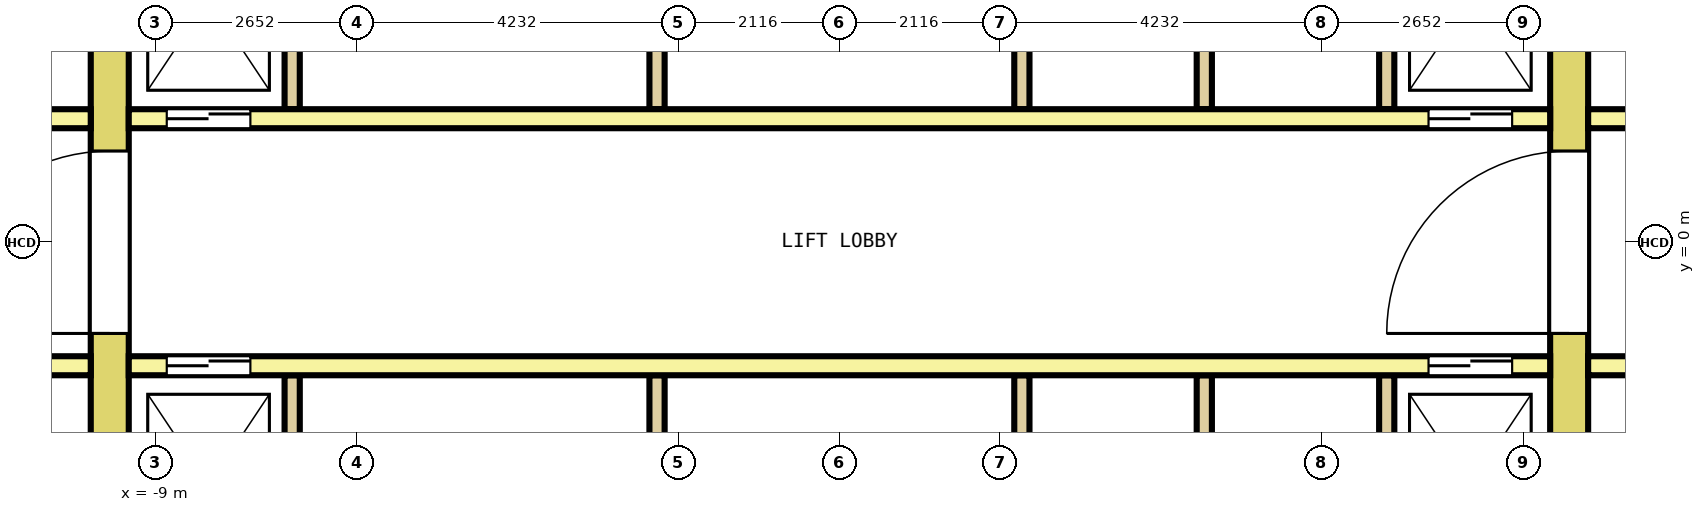
"""IFC4 building model, lengths in metres.
Left out: names, types, materials, properties, quantities, classifications, styles, units other than length and angle.
Written with IfcOpenShell. Run it as: python <this file> out.ifc"""

import sys

from ifc_helpers import new_model, si_unit, direction, frame, frame_2d, origin, place, context, subcontext, project, spatial, rectangle, extrude, element, fill, save


model = new_model("IFC4")
c1 = context("Model", 3, precision=1e-05, world=origin(), true_north=direction((0.0, 1.0)))
c2 = subcontext(c1, "Body", "Model", "MODEL_VIEW")
j1 = project(units=[si_unit("LENGTHUNIT", "METRE"), si_unit("PLANEANGLEUNIT", "RADIAN")], contexts=[c1])
p1 = place(None, origin())
s1 = spatial("IfcSite", under=j1, at=p1, CompositionType="ELEMENT")
p2 = place(p1, origin())
s2 = spatial("IfcBuilding", under=s1, at=p2, CompositionType="ELEMENT")
p3 = place(p2, frame((0.0, 0.0, 94.0)))
s3 = spatial("IfcBuildingStorey", under=s2, at=p3, CompositionType="ELEMENT", Elevation=94.0)
p4 = place(p3, frame((-9.6, -7.7, 0.0), z_axis=(0.0, 0.0, 1.0), x_axis=(0.0, 1.0, 0.0)))
e1 = element("IfcWall", 1, at=p4, inside=s3, PredefinedType="SHEAR", context=c2, shape_type="SweptSolid", body=[
    extrude(rectangle(XDim=15.4, YDim=0.5, at=frame_2d((7.7, 0.0))), origin(), (0.0, 0.0, 1.0), 4.1),
])
p5 = place(p4, frame((6.5, 0.0, 0.0)))
e2 = element("IfcOpeningElement", 2, at=p5, cuts=e1, PredefinedType="OPENING", context=c2, shape_type="SweptSolid", body=[
    extrude(rectangle(XDim=2.4, YDim=2.1, at=frame_2d((1.2, 1.05))), frame((0.0, 0.26, 0.0), z_axis=(0.0, -1.0, 0.0), x_axis=(1.0, 0.0, 0.0)), (0.0, 0.0, 1.0), 0.52),
])
p6 = place(p4, frame((13.4, 0.0, 0.0)))
e3 = element("IfcOpeningElement", 3, at=p6, cuts=e1, PredefinedType="OPENING", context=c2, shape_type="SweptSolid", body=[
    extrude(rectangle(XDim=1.2, YDim=2.1, at=frame_2d((0.6, 1.05))), frame((0.0, 0.26, 0.0), z_axis=(0.0, -1.0, 0.0), x_axis=(1.0, 0.0, 0.0)), (0.0, 0.0, 1.0), 0.52),
])
p7 = place(p4, frame((0.8, 0.0, 0.0)))
e4 = element("IfcOpeningElement", 4, at=p7, cuts=e1, PredefinedType="OPENING", context=c2, shape_type="SweptSolid", body=[
    extrude(rectangle(XDim=1.2, YDim=2.1, at=frame_2d((0.6, 1.05))), frame((0.0, 0.26, 0.0), z_axis=(0.0, -1.0, 0.0), x_axis=(1.0, 0.0, 0.0)), (0.0, 0.0, 1.0), 0.52),
])
p8 = place(p3, frame((9.6, -7.7, 0.0), z_axis=(0.0, 0.0, 1.0), x_axis=(0.0, 1.0, 0.0)))
e5 = element("IfcWall", 5, at=p8, inside=s3, PredefinedType="SHEAR", context=c2, shape_type="SweptSolid", body=[
    extrude(rectangle(XDim=15.4, YDim=0.5, at=frame_2d((7.7, 0.0))), origin(), (0.0, 0.0, 1.0), 4.1),
])
p9 = place(p8, frame((6.5, 0.0, 0.0)))
e6 = element("IfcOpeningElement", 6, at=p9, cuts=e5, PredefinedType="OPENING", context=c2, shape_type="SweptSolid", body=[
    extrude(rectangle(XDim=2.4, YDim=2.1, at=frame_2d((1.2, 1.05))), frame((0.0, 0.26, 0.0), z_axis=(0.0, -1.0, 0.0), x_axis=(1.0, 0.0, 0.0)), (0.0, 0.0, 1.0), 0.52),
])
p10 = place(p8, frame((13.4, 0.0, 0.0)))
e7 = element("IfcOpeningElement", 7, at=p10, cuts=e5, PredefinedType="OPENING", context=c2, shape_type="SweptSolid", body=[
    extrude(rectangle(XDim=1.2, YDim=2.1, at=frame_2d((0.6, 1.05))), frame((0.0, 0.26, 0.0), z_axis=(0.0, -1.0, 0.0), x_axis=(1.0, 0.0, 0.0)), (0.0, 0.0, 1.0), 0.52),
])
p11 = place(p8, frame((0.9, 0.0, 0.0)))
e8 = element("IfcOpeningElement", 8, at=p11, cuts=e5, PredefinedType="OPENING", context=c2, shape_type="SweptSolid", body=[
    extrude(rectangle(XDim=1.0, YDim=2.1, at=frame_2d((0.5, 1.05))), frame((0.0, 0.26, 0.0), z_axis=(0.0, -1.0, 0.0), x_axis=(1.0, 0.0, 0.0)), (0.0, 0.0, 1.0), 0.52),
])
p12 = place(p3, frame((-12.8, 1.625, 0.0), z_axis=(0.0, 0.0, 1.0), x_axis=(1.0, 0.0, 0.0)))
e9 = element("IfcWall", 9, at=p12, inside=s3, PredefinedType="SOLIDWALL", context=c2, shape_type="SweptSolid", body=[
    extrude(rectangle(XDim=2.95, YDim=0.25, at=frame_2d((1.475, 0.0))), origin(), (0.0, 0.0, 1.0), 4.1),
])
p13 = place(p12, frame((0.925, 0.0, 0.0)))
e10 = element("IfcOpeningElement", 10, at=p13, cuts=e9, PredefinedType="OPENING", context=c2, shape_type="SweptSolid", body=[
    extrude(rectangle(XDim=1.1, YDim=2.1, at=frame_2d((0.55, 1.05))), frame((0.0, 0.135, 0.0), z_axis=(0.0, -1.0, 0.0), x_axis=(1.0, 0.0, 0.0)), (0.0, 0.0, 1.0), 0.27),
])
p14 = place(p3, frame((-9.35, 1.625, 0.0), z_axis=(0.0, 0.0, 1.0), x_axis=(1.0, 0.0, 0.0)))
e11 = element("IfcWall", 11, at=p14, inside=s3, PredefinedType="SOLIDWALL", context=c2, shape_type="SweptSolid", body=[
    extrude(rectangle(XDim=18.7, YDim=0.25, at=frame_2d((9.35, 0.0))), origin(), (0.0, 0.0, 1.0), 4.1),
])
p15 = place(p14, frame((0.5, 0.0, 0.0)))
e12 = element("IfcOpeningElement", 12, at=p15, cuts=e11, PredefinedType="OPENING", context=c2, shape_type="SweptSolid", body=[
    extrude(rectangle(XDim=1.1, YDim=2.1, at=frame_2d((0.55, 1.05))), frame((0.0, 0.135, 0.0), z_axis=(0.0, -1.0, 0.0), x_axis=(1.0, 0.0, 0.0)), (0.0, 0.0, 1.0), 0.27),
])
p16 = place(p14, frame((17.1, 0.0, 0.0)))
e13 = element("IfcOpeningElement", 13, at=p16, cuts=e11, PredefinedType="OPENING", context=c2, shape_type="SweptSolid", body=[
    extrude(rectangle(XDim=1.1, YDim=2.1, at=frame_2d((0.55, 1.05))), frame((0.0, 0.135, 0.0), z_axis=(0.0, -1.0, 0.0), x_axis=(1.0, 0.0, 0.0)), (0.0, 0.0, 1.0), 0.27),
])
p17 = place(p3, frame((9.85, 1.625, 0.0), z_axis=(0.0, 0.0, 1.0), x_axis=(1.0, 0.0, 0.0)))
e14 = element("IfcWall", 14, at=p17, inside=s3, PredefinedType="SOLIDWALL", context=c2, shape_type="SweptSolid", body=[
    extrude(rectangle(XDim=2.95, YDim=0.25, at=frame_2d((1.475, 0.0))), origin(), (0.0, 0.0, 1.0), 4.1),
])
p18 = place(p17, frame((0.925, 0.0, 0.0)))
e15 = element("IfcOpeningElement", 15, at=p18, cuts=e14, PredefinedType="OPENING", context=c2, shape_type="SweptSolid", body=[
    extrude(rectangle(XDim=1.1, YDim=2.1, at=frame_2d((0.55, 1.05))), frame((0.0, 0.135, 0.0), z_axis=(0.0, -1.0, 0.0), x_axis=(1.0, 0.0, 0.0)), (0.0, 0.0, 1.0), 0.27),
])
for number, where, z_axis, x_axis in (
    (16, (-7.2, 1.75, 0.0), (0.0, 0.0, 1.0), (0.0, 1.0, 0.0)),
    (17, (-2.4, 1.75, 0.0), (0.0, 0.0, 1.0), (0.0, 1.0, 0.0)),
    (18, (2.4, 1.75, 0.0), (0.0, 0.0, 1.0), (0.0, 1.0, 0.0)),
    (19, (4.8, 1.75, 0.0), (0.0, 0.0, 1.0), (0.0, 1.0, 0.0)),
    (20, (7.2, 1.75, 0.0), (0.0, 0.0, 1.0), (0.0, 1.0, 0.0)),
):
    element("IfcWall", number, at=place(p3, frame(where, z_axis=z_axis, x_axis=x_axis)), inside=s3, PredefinedType="SOLIDWALL", context=c2, shape_type="SweptSolid", body=[
        extrude(rectangle(XDim=2.9, YDim=0.2, at=frame_2d((1.45, 0.0))), origin(), (0.0, 0.0, 1.0), 4.1),
    ])
p19 = place(p3, frame((-12.8, -1.625, 0.0), z_axis=(0.0, 0.0, 1.0), x_axis=(1.0, 0.0, 0.0)))
e21 = element("IfcWall", 21, at=p19, inside=s3, PredefinedType="SOLIDWALL", context=c2, shape_type="SweptSolid", body=[
    extrude(rectangle(XDim=2.95, YDim=0.25, at=frame_2d((1.475, 0.0))), origin(), (0.0, 0.0, 1.0), 4.1),
])
p20 = place(p19, frame((0.925, 0.0, 0.0)))
e22 = element("IfcOpeningElement", 22, at=p20, cuts=e21, PredefinedType="OPENING", context=c2, shape_type="SweptSolid", body=[
    extrude(rectangle(XDim=1.1, YDim=2.1, at=frame_2d((0.55, 1.05))), frame((0.0, 0.135, 0.0), z_axis=(0.0, -1.0, 0.0), x_axis=(1.0, 0.0, 0.0)), (0.0, 0.0, 1.0), 0.27),
])
p21 = place(p3, frame((-9.35, -1.625, 0.0), z_axis=(0.0, 0.0, 1.0), x_axis=(1.0, 0.0, 0.0)))
e23 = element("IfcWall", 23, at=p21, inside=s3, PredefinedType="SOLIDWALL", context=c2, shape_type="SweptSolid", body=[
    extrude(rectangle(XDim=18.7, YDim=0.25, at=frame_2d((9.35, 0.0))), origin(), (0.0, 0.0, 1.0), 4.1),
])
p22 = place(p21, frame((0.5, 0.0, 0.0)))
e24 = element("IfcOpeningElement", 24, at=p22, cuts=e23, PredefinedType="OPENING", context=c2, shape_type="SweptSolid", body=[
    extrude(rectangle(XDim=1.1, YDim=2.1, at=frame_2d((0.55, 1.05))), frame((0.0, 0.135, 0.0), z_axis=(0.0, -1.0, 0.0), x_axis=(1.0, 0.0, 0.0)), (0.0, 0.0, 1.0), 0.27),
])
p23 = place(p21, frame((17.1, 0.0, 0.0)))
e25 = element("IfcOpeningElement", 25, at=p23, cuts=e23, PredefinedType="OPENING", context=c2, shape_type="SweptSolid", body=[
    extrude(rectangle(XDim=1.1, YDim=2.1, at=frame_2d((0.55, 1.05))), frame((0.0, 0.135, 0.0), z_axis=(0.0, -1.0, 0.0), x_axis=(1.0, 0.0, 0.0)), (0.0, 0.0, 1.0), 0.27),
])
p24 = place(p3, frame((9.85, -1.625, 0.0), z_axis=(0.0, 0.0, 1.0), x_axis=(1.0, 0.0, 0.0)))
e26 = element("IfcWall", 26, at=p24, inside=s3, PredefinedType="SOLIDWALL", context=c2, shape_type="SweptSolid", body=[
    extrude(rectangle(XDim=2.95, YDim=0.25, at=frame_2d((1.475, 0.0))), origin(), (0.0, 0.0, 1.0), 4.1),
])
p25 = place(p24, frame((0.925, 0.0, 0.0)))
e27 = element("IfcOpeningElement", 27, at=p25, cuts=e26, PredefinedType="OPENING", context=c2, shape_type="SweptSolid", body=[
    extrude(rectangle(XDim=1.1, YDim=2.1, at=frame_2d((0.55, 1.05))), frame((0.0, 0.135, 0.0), z_axis=(0.0, -1.0, 0.0), x_axis=(1.0, 0.0, 0.0)), (0.0, 0.0, 1.0), 0.27),
])
for number, where, z_axis, x_axis in (
    (28, (-7.2, -4.65, 0.0), (0.0, 0.0, 1.0), (0.0, 1.0, 0.0)),
    (29, (-2.4, -4.65, 0.0), (0.0, 0.0, 1.0), (0.0, 1.0, 0.0)),
    (30, (2.4, -4.65, 0.0), (0.0, 0.0, 1.0), (0.0, 1.0, 0.0)),
    (31, (4.8, -4.65, 0.0), (0.0, 0.0, 1.0), (0.0, 1.0, 0.0)),
    (32, (7.2, -4.65, 0.0), (0.0, 0.0, 1.0), (0.0, 1.0, 0.0)),
):
    element("IfcWall", number, at=place(p3, frame(where, z_axis=z_axis, x_axis=x_axis)), inside=s3, PredefinedType="SOLIDWALL", context=c2, shape_type="SweptSolid", body=[
        extrude(rectangle(XDim=2.9, YDim=0.2, at=frame_2d((1.45, 0.0))), origin(), (0.0, 0.0, 1.0), 4.1),
    ])
p26 = place(p15, origin())
e33 = element("IfcDoor", 33, at=p26, inside=s3, OperationType="DOUBLE_DOOR_SLIDING", PredefinedType="DOOR", context=c2, shape_type="SweptSolid", body=[
    extrude(rectangle(XDim=1.1, YDim=2.1, at=frame_2d((0.55, 1.05))), frame((0.0, 0.075, 0.0), z_axis=(0.0, -1.0, 0.0), x_axis=(1.0, 0.0, 0.0)), (0.0, 0.0, 1.0), 0.15),
])
fill(e12, e33)
p27 = place(p16, origin())
e34 = element("IfcDoor", 34, at=p27, inside=s3, OperationType="DOUBLE_DOOR_SLIDING", PredefinedType="DOOR", context=c2, shape_type="SweptSolid", body=[
    extrude(rectangle(XDim=1.1, YDim=2.1, at=frame_2d((0.55, 1.05))), frame((0.0, 0.075, 0.0), z_axis=(0.0, -1.0, 0.0), x_axis=(1.0, 0.0, 0.0)), (0.0, 0.0, 1.0), 0.15),
])
fill(e13, e34)
p28 = place(p22, origin())
e35 = element("IfcDoor", 35, at=p28, inside=s3, OperationType="DOUBLE_DOOR_SLIDING", PredefinedType="DOOR", context=c2, shape_type="SweptSolid", body=[
    extrude(rectangle(XDim=1.1, YDim=2.1, at=frame_2d((0.55, 1.05))), frame((0.0, 0.075, 0.0), z_axis=(0.0, -1.0, 0.0), x_axis=(1.0, 0.0, 0.0)), (0.0, 0.0, 1.0), 0.15),
])
fill(e24, e35)
p29 = place(p23, origin())
e36 = element("IfcDoor", 36, at=p29, inside=s3, OperationType="DOUBLE_DOOR_SLIDING", PredefinedType="DOOR", context=c2, shape_type="SweptSolid", body=[
    extrude(rectangle(XDim=1.1, YDim=2.1, at=frame_2d((0.55, 1.05))), frame((0.0, 0.075, 0.0), z_axis=(0.0, -1.0, 0.0), x_axis=(1.0, 0.0, 0.0)), (0.0, 0.0, 1.0), 0.15),
])
fill(e25, e36)
p30 = place(p5, origin())
e37 = element("IfcDoor", 37, at=p30, inside=s3, OperationType="DOUBLE_DOOR_SINGLE_SWING", PredefinedType="DOOR", context=c2, shape_type="SweptSolid", body=[
    extrude(rectangle(XDim=2.4, YDim=2.1, at=frame_2d((1.2, 1.05))), frame((0.0, 0.2, 0.0), z_axis=(0.0, -1.0, 0.0), x_axis=(1.0, 0.0, 0.0)), (0.0, 0.0, 1.0), 0.4),
])
fill(e2, e37)
p31 = place(p9, origin())
e38 = element("IfcDoor", 38, at=p31, inside=s3, OperationType="DOUBLE_DOOR_SINGLE_SWING", PredefinedType="DOOR", context=c2, shape_type="SweptSolid", body=[
    extrude(rectangle(XDim=2.4, YDim=2.1, at=frame_2d((1.2, 1.05))), frame((0.0, 0.2, 0.0), z_axis=(0.0, -1.0, 0.0), x_axis=(1.0, 0.0, 0.0)), (0.0, 0.0, 1.0), 0.4),
])
fill(e6, e38)
save(model, sys.argv[1])
